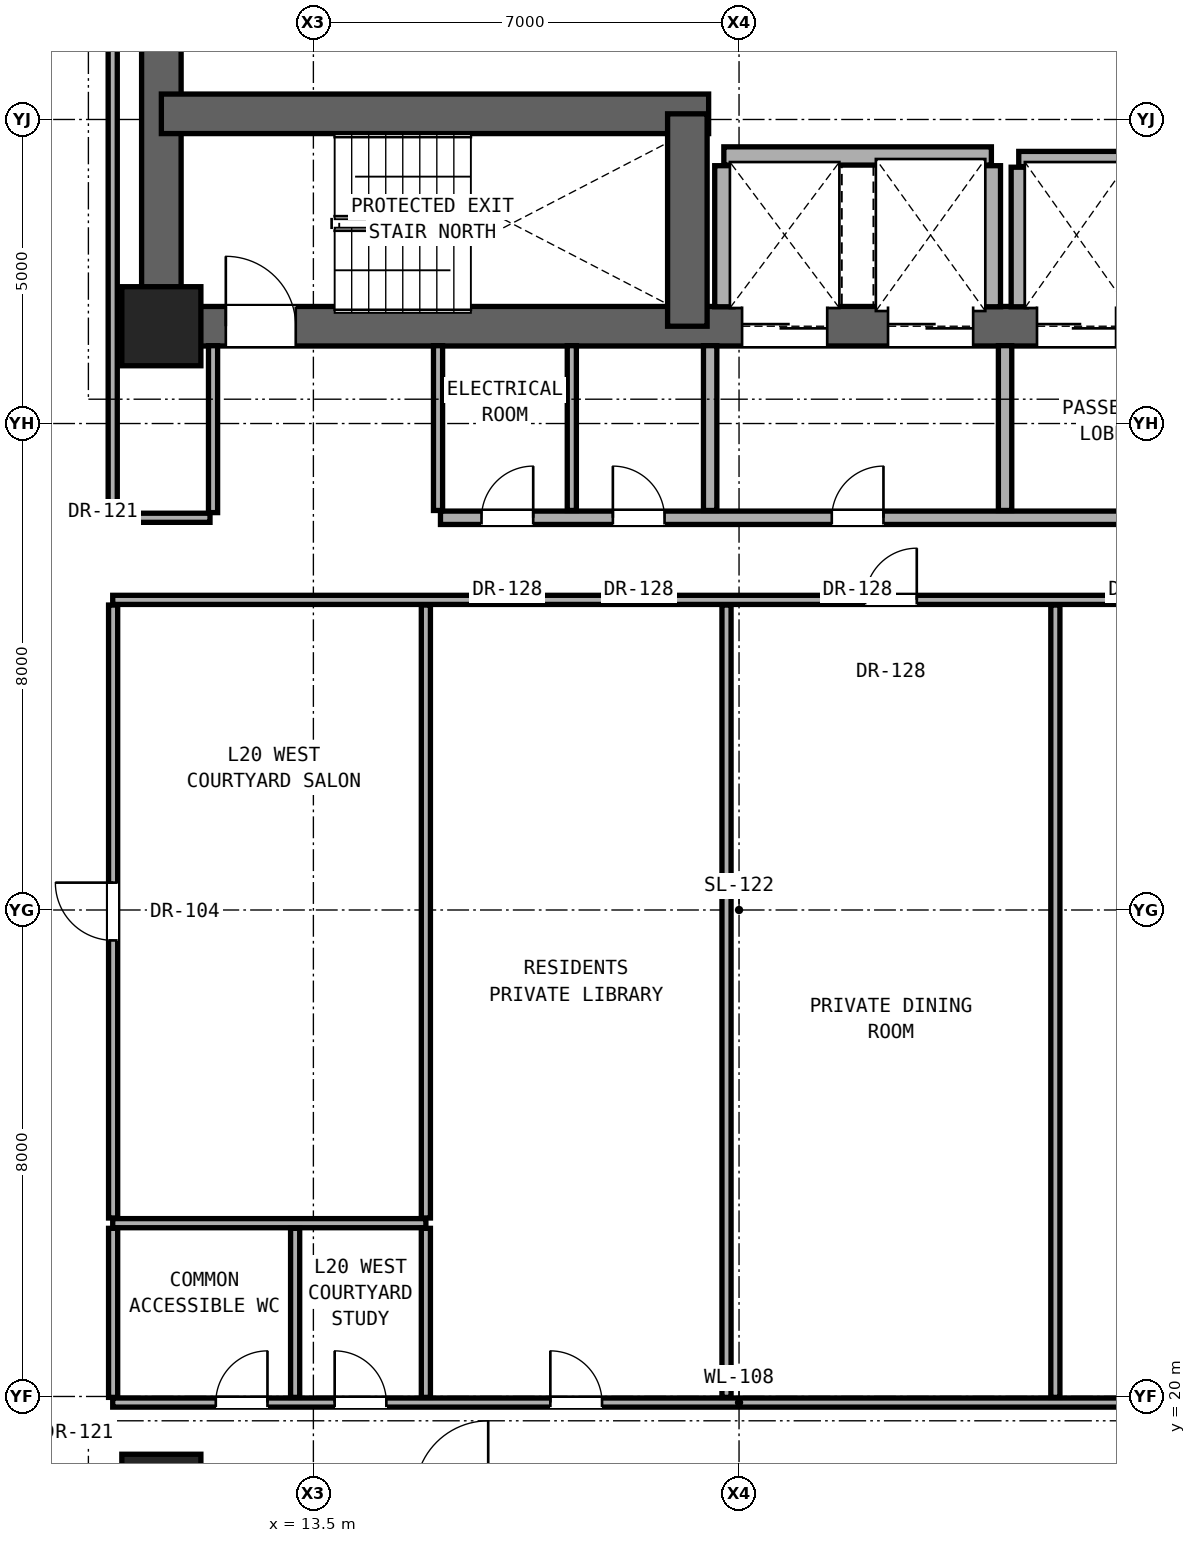
"""IFC4 building model, lengths in metres.
Left out: names, types, materials, properties, quantities, classifications, styles, units other than length and angle.
Written with IfcOpenShell. Run it as: python <this file> out.ifc"""

import sys

from ifc_helpers import new_model, si_unit, direction, frame, frame_2d, origin, origin_2d, place, context, subcontext, project, spatial, rectangle, extrude, element, fill, save


model = new_model("IFC4")
c1 = context("Model", 3, precision=1e-05, world=origin(), true_north=direction((0.0, 1.0)))
c2 = subcontext(c1, "Body", "Model", "MODEL_VIEW")
j1 = project(units=[si_unit("LENGTHUNIT", "METRE"), si_unit("PLANEANGLEUNIT", "RADIAN")], contexts=[c1])
p1 = place(None, origin())
s1 = spatial("IfcSite", under=j1, at=p1, CompositionType="ELEMENT")
p2 = place(p1, origin())
s2 = spatial("IfcBuilding", under=s1, at=p2, CompositionType="ELEMENT")
p3 = place(p2, frame((0.0, 0.0, 71.9)))
s3 = spatial("IfcBuildingStorey", under=s2, at=p3, CompositionType="ELEMENT", Elevation=71.9)
for number, where, z_axis, x_axis in (
    (1, (11.0, 18.4, 0.0), (0.0, 0.0, 1.0), (1.0, 0.0, 0.0)),
    (2, (11.0, 37.6, 0.0), (0.0, 0.0, 1.0), (1.0, 0.0, 0.0)),
):
    element("IfcColumn", number, at=place(p3, frame(where, z_axis=z_axis, x_axis=x_axis)), inside=s3, PredefinedType="COLUMN", context=c2, shape_type="SweptSolid", body=[
        extrude(rectangle(XDim=1.3, YDim=1.3, at=origin_2d()), origin(), (0.0, 0.0, 1.0), 3.3),
    ])
p4 = place(p3, frame((11.0, 37.6, 0.0), z_axis=(0.0, 0.0, 1.0), x_axis=(0.0, 1.0, 0.0)))
e3 = element("IfcWall", 3, at=p4, inside=s3, PredefinedType="SHEAR", context=c2, shape_type="SweptSolid", body=[
    extrude(rectangle(XDim=6.0, YDim=0.65, at=frame_2d((3.0, 0.0))), origin(), (0.0, 0.0, 1.0), 3.06),
])
p5 = place(p3, frame((11.0, 37.6, 0.0), z_axis=(0.0, 0.0, 1.0), x_axis=(1.0, 0.0, 0.0)))
e4 = element("IfcWall", 4, at=p5, inside=s3, PredefinedType="SHEAR", context=c2, shape_type="SweptSolid", body=[
    extrude(rectangle(XDim=19.0, YDim=0.65, at=frame_2d((9.5, 0.0))), origin(), (0.0, 0.0, 1.0), 3.06),
])
p6 = place(p5, frame((1.06, 0.0, 0.0)))
e5 = element("IfcOpeningElement", 5, at=p6, cuts=e4, PredefinedType="OPENING", context=c2, shape_type="SweptSolid", body=[
    extrude(rectangle(XDim=1.15, YDim=2.2, at=frame_2d((0.575, 1.1))), frame((0.0, 0.335, 0.0), z_axis=(0.0, -1.0, 0.0), x_axis=(1.0, 0.0, 0.0)), (0.0, 0.0, 1.0), 0.67),
])
p7 = place(p5, frame((9.55, 0.0, 0.0)))
e6 = element("IfcOpeningElement", 6, at=p7, cuts=e4, PredefinedType="OPENING", context=c2, shape_type="SweptSolid", body=[
    extrude(rectangle(XDim=1.4, YDim=2.35, at=frame_2d((0.7, 1.175))), frame((0.0, 0.335, 0.0), z_axis=(0.0, -1.0, 0.0), x_axis=(1.0, 0.0, 0.0)), (0.0, 0.0, 1.0), 0.67),
])
p8 = place(p5, frame((11.95, 0.0, 0.0)))
e7 = element("IfcOpeningElement", 7, at=p8, cuts=e4, PredefinedType="OPENING", context=c2, shape_type="SweptSolid", body=[
    extrude(rectangle(XDim=1.4, YDim=2.35, at=frame_2d((0.7, 1.175))), frame((0.0, 0.335, 0.0), z_axis=(0.0, -1.0, 0.0), x_axis=(1.0, 0.0, 0.0)), (0.0, 0.0, 1.0), 0.67),
])
p9 = place(p5, frame((14.4, 0.0, 0.0)))
e8 = element("IfcOpeningElement", 8, at=p9, cuts=e4, PredefinedType="OPENING", context=c2, shape_type="SweptSolid", body=[
    extrude(rectangle(XDim=1.3, YDim=2.3, at=frame_2d((0.65, 1.15))), frame((0.0, 0.335, 0.0), z_axis=(0.0, -1.0, 0.0), x_axis=(1.0, 0.0, 0.0)), (0.0, 0.0, 1.0), 0.67),
])
p10 = place(p5, frame((16.6, 0.0, 0.0)))
e9 = element("IfcOpeningElement", 9, at=p10, cuts=e4, PredefinedType="OPENING", context=c2, shape_type="SweptSolid", body=[
    extrude(rectangle(XDim=1.3, YDim=2.3, at=frame_2d((0.65, 1.15))), frame((0.0, 0.335, 0.0), z_axis=(0.0, -1.0, 0.0), x_axis=(1.0, 0.0, 0.0)), (0.0, 0.0, 1.0), 0.67),
])
p11 = place(p3, frame((11.0, 41.093, 0.0), z_axis=(0.0, 0.0, 1.0), x_axis=(1.0, 0.0, 0.0)))
e10 = element("IfcWall", 10, at=p11, inside=s3, PredefinedType="SHEAR", context=c2, shape_type="SweptSolid", body=[
    extrude(rectangle(XDim=9.0, YDim=0.65, at=frame_2d((4.5, 0.0))), origin(), (0.0, 0.0, 1.0), 3.06),
])
p12 = place(p3, frame((19.65, 37.6, 0.0), z_axis=(0.0, 0.0, 1.0), x_axis=(0.0, 1.0, 0.0)))
e11 = element("IfcWall", 11, at=p12, inside=s3, PredefinedType="SHEAR", context=c2, shape_type="SweptSolid", body=[
    extrude(rectangle(XDim=3.493, YDim=0.65, at=frame_2d((1.747, 0.0))), origin(), (0.0, 0.0, 1.0), 3.06),
])
p13 = place(p3, frame((10.2, 19.9, 0.0), z_axis=(0.0, 0.0, 1.0), x_axis=(1.0, 0.0, 0.0)))
e12 = element("IfcWall", 12, at=p13, inside=s3, PredefinedType="PARTITIONING", context=c2, shape_type="SweptSolid", body=[
    extrude(rectangle(XDim=20.6, YDim=0.15, at=frame_2d((10.3, 0.0))), origin(), (0.0, 0.0, 1.0), 2.104),
])
p14 = place(p13, frame((1.695, 0.0, 0.0)))
e13 = element("IfcOpeningElement", 13, at=p14, cuts=e12, PredefinedType="OPENING", context=c2, shape_type="SweptSolid", body=[
    extrude(rectangle(XDim=0.85, YDim=2.01, at=frame_2d((0.425, 1.005))), frame((0.0, 0.085, 0.0), z_axis=(0.0, -1.0, 0.0), x_axis=(1.0, 0.0, 0.0)), (0.0, 0.0, 1.0), 0.17),
])
p15 = place(p13, frame((3.65, 0.0, 0.0)))
e14 = element("IfcOpeningElement", 14, at=p15, cuts=e12, PredefinedType="OPENING", context=c2, shape_type="SweptSolid", body=[
    extrude(rectangle(XDim=0.85, YDim=2.01, at=frame_2d((0.425, 1.005))), frame((0.0, 0.085, 0.0), z_axis=(0.0, -1.0, 0.0), x_axis=(1.0, 0.0, 0.0)), (0.0, 0.0, 1.0), 0.17),
])
p16 = place(p13, frame((7.197, 0.0, 0.0)))
e15 = element("IfcOpeningElement", 15, at=p16, cuts=e12, PredefinedType="OPENING", context=c2, shape_type="SweptSolid", body=[
    extrude(rectangle(XDim=0.85, YDim=2.01, at=frame_2d((0.425, 1.005))), frame((0.0, 0.085, 0.0), z_axis=(0.0, -1.0, 0.0), x_axis=(1.0, 0.0, 0.0)), (0.0, 0.0, 1.0), 0.17),
])
p17 = place(p3, frame((10.2, 22.85, 0.0), z_axis=(0.0, 0.0, 1.0), x_axis=(1.0, 0.0, 0.0)))
e16 = element("IfcWall", 16, at=p17, inside=s3, PredefinedType="PARTITIONING", context=c2, shape_type="SweptSolid", body=[
    extrude(rectangle(XDim=5.15, YDim=0.15, at=frame_2d((2.575, 0.0))), origin(), (0.0, 0.0, 1.0), 2.104),
])
p18 = place(p3, frame((10.2, 33.1, 0.0), z_axis=(0.0, 0.0, 1.0), x_axis=(1.0, 0.0, 0.0)))
e17 = element("IfcWall", 17, at=p18, inside=s3, PredefinedType="PARTITIONING", context=c2, shape_type="SweptSolid", body=[
    extrude(rectangle(XDim=20.6, YDim=0.15, at=frame_2d((10.3, 0.0))), origin(), (0.0, 0.0, 1.0), 2.104),
])
p19 = place(p18, frame((12.373, 0.0, 0.0)))
e18 = element("IfcOpeningElement", 18, at=p19, cuts=e17, PredefinedType="OPENING", context=c2, shape_type="SweptSolid", body=[
    extrude(rectangle(XDim=0.85, YDim=2.01, at=frame_2d((0.425, 1.005))), frame((0.0, 0.085, 0.0), z_axis=(0.0, -1.0, 0.0), x_axis=(1.0, 0.0, 0.0)), (0.0, 0.0, 1.0), 0.17),
])
p20 = place(p18, frame((17.606, 0.0, 0.0)))
e19 = element("IfcOpeningElement", 19, at=p20, cuts=e17, PredefinedType="OPENING", context=c2, shape_type="SweptSolid", body=[
    extrude(rectangle(XDim=0.85, YDim=2.01, at=frame_2d((0.425, 1.005))), frame((0.0, 0.085, 0.0), z_axis=(0.0, -1.0, 0.0), x_axis=(1.0, 0.0, 0.0)), (0.0, 0.0, 1.0), 0.17),
])
p21 = place(p3, frame((10.2, 34.45, 0.0), z_axis=(0.0, 0.0, 1.0), x_axis=(1.0, 0.0, 0.0)))
e20 = element("IfcWall", 20, at=p21, inside=s3, PredefinedType="PARTITIONING", context=c2, shape_type="SweptSolid", body=[
    extrude(rectangle(XDim=1.6, YDim=0.15, at=frame_2d((0.8, 0.0))), origin(), (0.0, 0.0, 1.0), 2.104),
])
p22 = place(p3, frame((15.59, 34.45, 0.0), z_axis=(0.0, 0.0, 1.0), x_axis=(1.0, 0.0, 0.0)))
e21 = element("IfcWall", 21, at=p22, inside=s3, PredefinedType="SOLIDWALL", context=c2, shape_type="SweptSolid", body=[
    extrude(rectangle(XDim=15.21, YDim=0.22, at=frame_2d((7.605, 0.0))), origin(), (0.0, 0.0, 1.0), 2.104),
])
p23 = place(p22, frame((6.435, 0.0, 0.0)))
e22 = element("IfcOpeningElement", 22, at=p23, cuts=e21, PredefinedType="OPENING", context=c2, shape_type="SweptSolid", body=[
    extrude(rectangle(XDim=0.85, YDim=2.01, at=frame_2d((0.425, 1.005))), frame((0.0, 0.12, 0.0), z_axis=(0.0, -1.0, 0.0), x_axis=(1.0, 0.0, 0.0)), (0.0, 0.0, 1.0), 0.24),
])
p24 = place(p22, frame((11.135, 0.0, 0.0)))
e23 = element("IfcOpeningElement", 23, at=p24, cuts=e21, PredefinedType="OPENING", context=c2, shape_type="SweptSolid", body=[
    extrude(rectangle(XDim=0.85, YDim=2.01, at=frame_2d((0.425, 1.005))), frame((0.0, 0.12, 0.0), z_axis=(0.0, -1.0, 0.0), x_axis=(1.0, 0.0, 0.0)), (0.0, 0.0, 1.0), 0.24),
])
p25 = place(p22, frame((0.675, 0.0, 0.0)))
e24 = element("IfcOpeningElement", 24, at=p25, cuts=e21, PredefinedType="OPENING", context=c2, shape_type="SweptSolid", body=[
    extrude(rectangle(XDim=0.85, YDim=2.01, at=frame_2d((0.425, 1.005))), frame((0.0, 0.12, 0.0), z_axis=(0.0, -1.0, 0.0), x_axis=(1.0, 0.0, 0.0)), (0.0, 0.0, 1.0), 0.24),
])
p26 = place(p22, frame((2.835, 0.0, 0.0)))
e25 = element("IfcOpeningElement", 25, at=p26, cuts=e21, PredefinedType="OPENING", context=c2, shape_type="SweptSolid", body=[
    extrude(rectangle(XDim=0.85, YDim=2.01, at=frame_2d((0.425, 1.005))), frame((0.0, 0.12, 0.0), z_axis=(0.0, -1.0, 0.0), x_axis=(1.0, 0.0, 0.0)), (0.0, 0.0, 1.0), 0.24),
])
p27 = place(p3, frame((25.1, 40.35, 0.0), z_axis=(0.0, 0.0, 1.0), x_axis=(1.0, 0.0, 0.0)))
e26 = element("IfcWall", 26, at=p27, inside=s3, PredefinedType="SOLIDWALL", context=c2, shape_type="SweptSolid", body=[
    extrude(rectangle(XDim=4.1, YDim=0.25, at=frame_2d((2.05, 0.0))), origin(), (0.0, 0.0, 1.0), 3.06),
])
p28 = place(p3, frame((20.25, 40.4, 0.0), z_axis=(0.0, 0.0, 1.0), x_axis=(1.0, 0.0, 0.0)))
e27 = element("IfcWall", 27, at=p28, inside=s3, PredefinedType="SOLIDWALL", context=c2, shape_type="SweptSolid", body=[
    extrude(rectangle(XDim=4.4, YDim=0.3, at=frame_2d((2.2, 0.0))), origin(), (0.0, 0.0, 1.0), 3.06),
])
p29 = place(p3, frame((10.207, 19.985, 0.0), z_axis=(0.0, 0.0, 1.0), x_axis=(0.0, 1.0, 0.0)))
e28 = element("IfcWall", 28, at=p29, inside=s3, PredefinedType="PARTITIONING", context=c2, shape_type="SweptSolid", body=[
    extrude(rectangle(XDim=2.78, YDim=0.15, at=frame_2d((1.39, 0.0))), origin(), (0.0, 0.0, 1.0), 3.06),
])
p30 = place(p3, frame((10.207, 22.935, 0.0), z_axis=(0.0, 0.0, 1.0), x_axis=(0.0, 1.0, 0.0)))
e29 = element("IfcWall", 29, at=p30, inside=s3, PredefinedType="PARTITIONING", context=c2, shape_type="SweptSolid", body=[
    extrude(rectangle(XDim=10.08, YDim=0.15, at=frame_2d((5.04, 0.0))), origin(), (0.0, 0.0, 1.0), 2.279),
])
p31 = place(p30, frame((4.565, 0.0, 0.0)))
e30 = element("IfcOpeningElement", 30, at=p31, cuts=e29, PredefinedType="OPENING", context=c2, shape_type="SweptSolid", body=[
    extrude(rectangle(XDim=0.95, YDim=2.15, at=frame_2d((0.475, 1.075))), frame((0.0, 0.085, 0.0), z_axis=(0.0, -1.0, 0.0), x_axis=(1.0, 0.0, 0.0)), (0.0, 0.0, 1.0), 0.17),
])
p32 = place(p3, frame((10.2, 34.535, 0.0), z_axis=(0.0, 0.0, 1.0), x_axis=(0.0, 1.0, 0.0)))
e31 = element("IfcWall", 31, at=p32, inside=s3, PredefinedType="PARTITIONING", context=c2, shape_type="SweptSolid", body=[
    extrude(rectangle(XDim=9.13, YDim=0.15, at=frame_2d((4.565, 0.0))), origin(), (0.0, 0.0, 1.0), 2.436),
])
p33 = place(p3, frame((11.85, 34.535, 0.0), z_axis=(0.0, 0.0, 1.0), x_axis=(0.0, 1.0, 0.0)))
e32 = element("IfcWall", 32, at=p33, inside=s3, PredefinedType="PARTITIONING", context=c2, shape_type="SweptSolid", body=[
    extrude(rectangle(XDim=2.745, YDim=0.15, at=frame_2d((1.373, 0.0))), origin(), (0.0, 0.0, 1.0), 3.06),
])
for number, where, z_axis, x_axis in (
    (33, (13.2, 19.985, 0.0), (0.0, 0.0, 1.0), (0.0, 1.0, 0.0)),
    (34, (15.35, 19.985, 0.0), (0.0, 0.0, 1.0), (0.0, 1.0, 0.0)),
):
    element("IfcWall", number, at=place(p3, frame(where, z_axis=z_axis, x_axis=x_axis)), inside=s3, PredefinedType="PARTITIONING", context=c2, shape_type="SweptSolid", body=[
        extrude(rectangle(XDim=2.78, YDim=0.15, at=frame_2d((1.39, 0.0))), origin(), (0.0, 0.0, 1.0), 3.06),
    ])
p34 = place(p3, frame((15.35, 22.935, 0.0), z_axis=(0.0, 0.0, 1.0), x_axis=(0.0, 1.0, 0.0)))
e35 = element("IfcWall", 35, at=p34, inside=s3, PredefinedType="PARTITIONING", context=c2, shape_type="SweptSolid", body=[
    extrude(rectangle(XDim=10.08, YDim=0.15, at=frame_2d((5.04, 0.0))), origin(), (0.0, 0.0, 1.0), 2.104),
])
p35 = place(p3, frame((15.55, 34.57, 0.0), z_axis=(0.0, 0.0, 1.0), x_axis=(0.0, 1.0, 0.0)))
e36 = element("IfcWall", 36, at=p35, inside=s3, PredefinedType="PARTITIONING", context=c2, shape_type="SweptSolid", body=[
    extrude(rectangle(XDim=2.71, YDim=0.15, at=frame_2d((1.355, 0.0))), origin(), (0.0, 0.0, 1.0), 2.589),
])
p36 = place(p3, frame((17.75, 34.57, 0.0), z_axis=(0.0, 0.0, 1.0), x_axis=(0.0, 1.0, 0.0)))
e37 = element("IfcWall", 37, at=p36, inside=s3, PredefinedType="PARTITIONING", context=c2, shape_type="SweptSolid", body=[
    extrude(rectangle(XDim=2.71, YDim=0.15, at=frame_2d((1.355, 0.0))), origin(), (0.0, 0.0, 1.0), 3.06),
])
p37 = place(p3, frame((20.025, 34.57, 0.0), z_axis=(0.0, 0.0, 1.0), x_axis=(0.0, 1.0, 0.0)))
e38 = element("IfcWall", 38, at=p37, inside=s3, PredefinedType="SOLIDWALL", context=c2, shape_type="SweptSolid", body=[
    extrude(rectangle(XDim=2.71, YDim=0.22, at=frame_2d((1.355, 0.0))), origin(), (0.0, 0.0, 1.0), 3.06),
])
p38 = place(p3, frame((20.294, 19.985, 0.0), z_axis=(0.0, 0.0, 1.0), x_axis=(0.0, 1.0, 0.0)))
e39 = element("IfcWall", 39, at=p38, inside=s3, PredefinedType="PARTITIONING", context=c2, shape_type="SweptSolid", body=[
    extrude(rectangle(XDim=13.03, YDim=0.15, at=frame_2d((6.515, 0.0))), origin(), (0.0, 0.0, 1.0), 2.104),
])
for number, where, z_axis, x_axis in (
    (40, (20.25, 37.92, 0.0), (0.0, 0.0, 1.0), (0.0, 1.0, 0.0)),
    (41, (24.65, 37.92, 0.0), (0.0, 0.0, 1.0), (0.0, 1.0, 0.0)),
):
    element("IfcWall", number, at=place(p3, frame(where, z_axis=z_axis, x_axis=x_axis)), inside=s3, PredefinedType="SOLIDWALL", context=c2, shape_type="SweptSolid", body=[
        extrude(rectangle(XDim=2.32, YDim=0.3, at=frame_2d((1.16, 0.0))), origin(), (0.0, 0.0, 1.0), 3.06),
    ])
p39 = place(p3, frame((24.875, 34.57, 0.0), z_axis=(0.0, 0.0, 1.0), x_axis=(0.0, 1.0, 0.0)))
e42 = element("IfcWall", 42, at=p39, inside=s3, PredefinedType="SOLIDWALL", context=c2, shape_type="SweptSolid", body=[
    extrude(rectangle(XDim=2.71, YDim=0.22, at=frame_2d((1.355, 0.0))), origin(), (0.0, 0.0, 1.0), 3.06),
])
p40 = place(p3, frame((25.1, 37.92, 0.0), z_axis=(0.0, 0.0, 1.0), x_axis=(0.0, 1.0, 0.0)))
e43 = element("IfcWall", 43, at=p40, inside=s3, PredefinedType="SOLIDWALL", context=c2, shape_type="SweptSolid", body=[
    extrude(rectangle(XDim=2.295, YDim=0.25, at=frame_2d((1.147, 0.0))), origin(), (0.0, 0.0, 1.0), 3.06),
])
p41 = place(p3, frame((25.702, 19.985, 0.0), z_axis=(0.0, 0.0, 1.0), x_axis=(0.0, 1.0, 0.0)))
e44 = element("IfcWall", 44, at=p41, inside=s3, PredefinedType="PARTITIONING", context=c2, shape_type="SweptSolid", body=[
    extrude(rectangle(XDim=13.03, YDim=0.15, at=frame_2d((6.515, 0.0))), origin(), (0.0, 0.0, 1.0), 2.104),
])
p42 = place(p6, origin())
e45 = element("IfcDoor", 45, at=p42, inside=s3, OperationType="SINGLE_SWING_LEFT", PredefinedType="DOOR", context=c2, shape_type="SweptSolid", body=[
    extrude(rectangle(XDim=1.15, YDim=2.2, at=frame_2d((0.575, 1.1))), frame((0.0, 0.025, 0.0), z_axis=(0.0, -1.0, 0.0), x_axis=(1.0, 0.0, 0.0)), (0.0, 0.0, 1.0), 0.05),
])
fill(e5, e45)
p43 = place(p23, origin())
e46 = element("IfcDoor", 46, at=p43, inside=s3, OperationType="SINGLE_SWING_RIGHT", PredefinedType="DOOR", context=c2, shape_type="SweptSolid", body=[
    extrude(rectangle(XDim=0.85, YDim=2.01, at=frame_2d((0.425, 1.005))), frame((0.0, 0.025, 0.0), z_axis=(0.0, -1.0, 0.0), x_axis=(1.0, 0.0, 0.0)), (0.0, 0.0, 1.0), 0.05),
])
fill(e22, e46)
p44 = place(p25, origin())
e47 = element("IfcDoor", 47, at=p44, inside=s3, OperationType="SINGLE_SWING_RIGHT", PredefinedType="DOOR", context=c2, shape_type="SweptSolid", body=[
    extrude(rectangle(XDim=0.85, YDim=2.01, at=frame_2d((0.425, 1.005))), frame((0.0, 0.025, 0.0), z_axis=(0.0, -1.0, 0.0), x_axis=(1.0, 0.0, 0.0)), (0.0, 0.0, 1.0), 0.05),
])
fill(e24, e47)
p45 = place(p26, origin())
e48 = element("IfcDoor", 48, at=p45, inside=s3, OperationType="SINGLE_SWING_LEFT", PredefinedType="DOOR", context=c2, shape_type="SweptSolid", body=[
    extrude(rectangle(XDim=0.85, YDim=2.01, at=frame_2d((0.425, 1.005))), frame((0.0, 0.025, 0.0), z_axis=(0.0, -1.0, 0.0), x_axis=(1.0, 0.0, 0.0)), (0.0, 0.0, 1.0), 0.05),
])
fill(e25, e48)
p46 = place(p14, origin())
e49 = element("IfcDoor", 49, at=p46, inside=s3, OperationType="SINGLE_SWING_RIGHT", PredefinedType="DOOR", context=c2, shape_type="SweptSolid", body=[
    extrude(rectangle(XDim=0.85, YDim=2.01, at=frame_2d((0.425, 1.005))), frame((0.0, 0.025, 0.0), z_axis=(0.0, -1.0, 0.0), x_axis=(1.0, 0.0, 0.0)), (0.0, 0.0, 1.0), 0.05),
])
fill(e13, e49)
p47 = place(p15, origin())
e50 = element("IfcDoor", 50, at=p47, inside=s3, OperationType="SINGLE_SWING_LEFT", PredefinedType="DOOR", context=c2, shape_type="SweptSolid", body=[
    extrude(rectangle(XDim=0.85, YDim=2.01, at=frame_2d((0.425, 1.005))), frame((0.0, 0.025, 0.0), z_axis=(0.0, -1.0, 0.0), x_axis=(1.0, 0.0, 0.0)), (0.0, 0.0, 1.0), 0.05),
])
fill(e14, e50)
p48 = place(p31, origin())
e51 = element("IfcDoor", 51, at=p48, inside=s3, OperationType="SINGLE_SWING_RIGHT", PredefinedType="DOOR", context=c2, shape_type="SweptSolid", body=[
    extrude(rectangle(XDim=0.95, YDim=2.15, at=frame_2d((0.475, 1.075))), frame((0.0, 0.025, 0.0), z_axis=(0.0, -1.0, 0.0), x_axis=(1.0, 0.0, 0.0)), (0.0, 0.0, 1.0), 0.05),
])
fill(e30, e51)
p49 = place(p16, origin())
e52 = element("IfcDoor", 52, at=p49, inside=s3, OperationType="SINGLE_SWING_LEFT", PredefinedType="DOOR", context=c2, shape_type="SweptSolid", body=[
    extrude(rectangle(XDim=0.85, YDim=2.01, at=frame_2d((0.425, 1.005))), frame((0.0, 0.025, 0.0), z_axis=(0.0, -1.0, 0.0), x_axis=(1.0, 0.0, 0.0)), (0.0, 0.0, 1.0), 0.05),
])
fill(e15, e52)
p50 = place(p19, origin())
e53 = element("IfcDoor", 53, at=p50, inside=s3, OperationType="SINGLE_SWING_RIGHT", PredefinedType="DOOR", context=c2, shape_type="SweptSolid", body=[
    extrude(rectangle(XDim=0.85, YDim=2.01, at=frame_2d((0.425, 1.005))), frame((0.0, 0.025, 0.0), z_axis=(0.0, -1.0, 0.0), x_axis=(1.0, 0.0, 0.0)), (0.0, 0.0, 1.0), 0.05),
])
fill(e18, e53)
p51 = place(p7, origin())
e54 = element("IfcDoor", 54, at=p51, inside=s3, OperationType="DOUBLE_DOOR_SLIDING", PredefinedType="DOOR", context=c2, shape_type="SweptSolid", body=[
    extrude(rectangle(XDim=1.4, YDim=2.35, at=frame_2d((0.7, 1.175))), frame((0.0, 0.025, 0.0), z_axis=(0.0, -1.0, 0.0), x_axis=(1.0, 0.0, 0.0)), (0.0, 0.0, 1.0), 0.05),
])
fill(e6, e54)
p52 = place(p8, origin())
e55 = element("IfcDoor", 55, at=p52, inside=s3, OperationType="DOUBLE_DOOR_SLIDING", PredefinedType="DOOR", context=c2, shape_type="SweptSolid", body=[
    extrude(rectangle(XDim=1.4, YDim=2.35, at=frame_2d((0.7, 1.175))), frame((0.0, 0.025, 0.0), z_axis=(0.0, -1.0, 0.0), x_axis=(1.0, 0.0, 0.0)), (0.0, 0.0, 1.0), 0.05),
])
fill(e7, e55)
p53 = place(p9, origin())
e56 = element("IfcDoor", 56, at=p53, inside=s3, OperationType="DOUBLE_DOOR_SLIDING", PredefinedType="DOOR", context=c2, shape_type="SweptSolid", body=[
    extrude(rectangle(XDim=1.3, YDim=2.3, at=frame_2d((0.65, 1.15))), frame((0.0, 0.025, 0.0), z_axis=(0.0, -1.0, 0.0), x_axis=(1.0, 0.0, 0.0)), (0.0, 0.0, 1.0), 0.05),
])
fill(e8, e56)
save(model, sys.argv[1])
